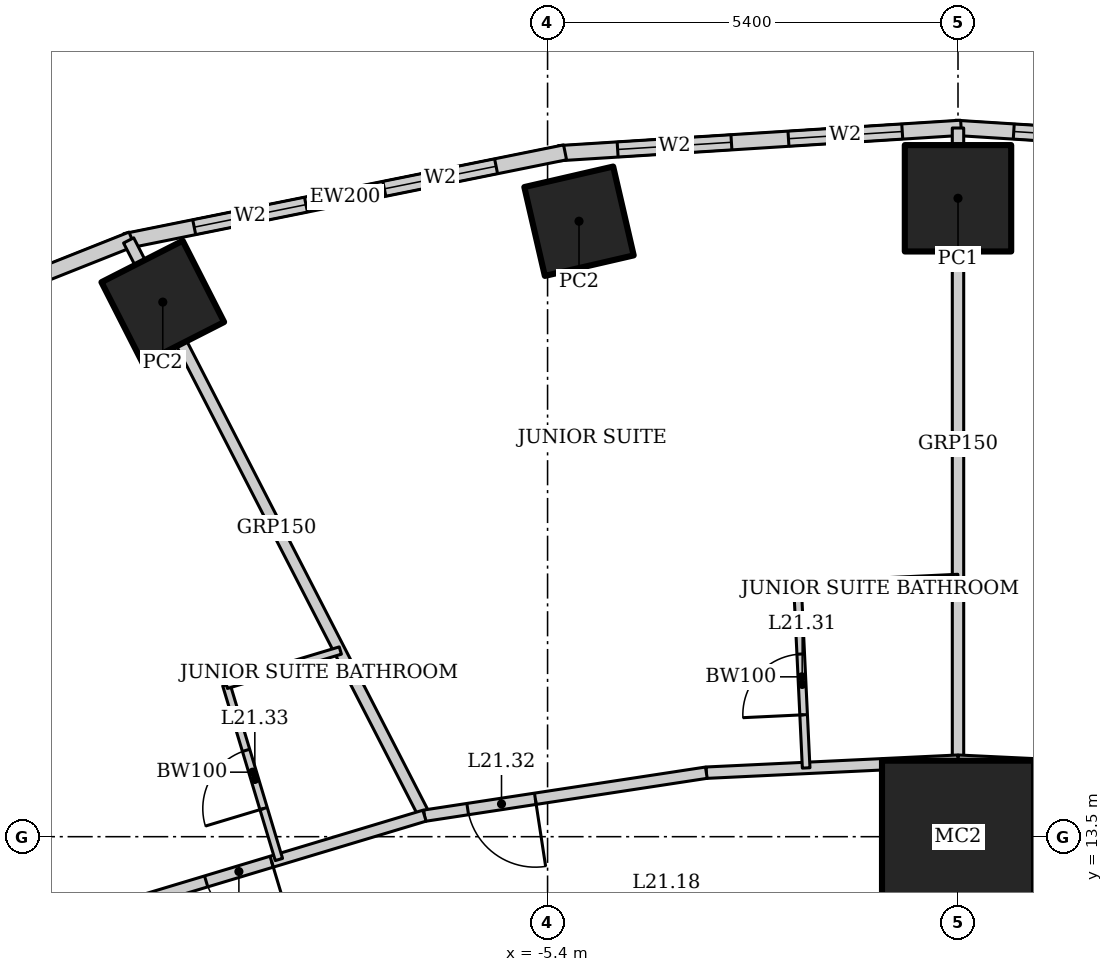
"""IFC4 building model, lengths in metres.
Left out: names, types, materials, properties, quantities, classifications, styles, units other than length and angle.
Written with IfcOpenShell. Run it as: python <this file> out.ifc"""

import sys

from ifc_helpers import new_model, si_unit, direction, frame, frame_2d, origin, origin_2d, place, context, subcontext, project, spatial, rectangle, hollow_rectangle, extrude, element, fill, save


model = new_model("IFC4")
c1 = context("Model", 3, precision=1e-05, world=origin(), true_north=direction((0.0, 1.0)))
c2 = subcontext(c1, "Body", "Model", "MODEL_VIEW")
j1 = project(units=[si_unit("LENGTHUNIT", "METRE"), si_unit("PLANEANGLEUNIT", "RADIAN")], contexts=[c1])
p1 = place(None, origin())
s1 = spatial("IfcSite", under=j1, at=p1, CompositionType="ELEMENT")
p2 = place(p1, origin())
s2 = spatial("IfcBuilding", under=s1, at=p2, CompositionType="ELEMENT")
p3 = place(p2, frame((0.0, 0.0, 91.0)))
s3 = spatial("IfcBuildingStorey", under=s2, at=p3, CompositionType="ELEMENT", Elevation=91.0)
p4 = place(p3, frame((0.0, 13.5, 0.0), z_axis=(0.0, 0.0, 1.0), x_axis=(1.0, 0.0, 0.0)))
e1 = element("IfcColumn", 1, at=p4, inside=s3, PredefinedType="COLUMN", context=c2, shape_type="SweptSolid", body=[
    extrude(hollow_rectangle(XDim=2.0, YDim=2.0, WallThickness=0.17, at=origin_2d()), origin(), (0.0, 0.0, 1.0), 3.6),
])
p5 = place(p3, frame((0.0, 21.9, 0.0), z_axis=(0.0, 0.0, 1.0), x_axis=(1.0, 0.0, 0.0)))
e2 = element("IfcColumn", 2, at=p5, inside=s3, PredefinedType="COLUMN", context=c2, shape_type="SweptSolid", body=[
    extrude(hollow_rectangle(XDim=1.4, YDim=1.4, WallThickness=0.1, at=origin_2d()), origin(), (0.0, 0.0, 1.0), 3.6),
])
for number, where, z_axis, x_axis in (
    (3, (-4.986, 21.598, 0.0), (0.0, 0.0, 1.0), (0.974, 0.225, 0.0)),
    (4, (-10.463, 20.534, 0.0), (0.0, 0.0, 1.0), (0.891, 0.454, 0.0)),
):
    element("IfcColumn", number, at=place(p3, frame(where, z_axis=z_axis, x_axis=x_axis)), inside=s3, PredefinedType="COLUMN", context=c2, shape_type="SweptSolid", body=[
        extrude(hollow_rectangle(XDim=1.2, YDim=1.2, WallThickness=0.1, at=origin_2d()), origin(), (0.0, 0.0, 1.0), 3.6),
    ])
p6 = place(p3, frame((5.253, 22.493, 0.0), z_axis=(0.0, 0.0, 1.0), x_axis=(-0.998018582375, 0.062919863585, 0.0)))
e5 = element("IfcWall", 5, at=p6, inside=s3, PredefinedType="SOLIDWALL", context=c2, shape_type="SweptSolid", body=[
    extrude(rectangle(XDim=5.304, YDim=0.2, at=frame_2d((2.652, 0.0))), origin(), (0.0, 0.0, 1.0), 3.45),
])
p7 = place(p6, frame((0.776, 0.0, 0.5)))
e6 = element("IfcOpeningElement", 6, at=p7, cuts=e5, PredefinedType="OPENING", context=c2, shape_type="SweptSolid", body=[
    extrude(rectangle(XDim=1.5, YDim=2.2, at=frame_2d((0.75, 1.1))), frame((0.0, 0.11, 0.0), z_axis=(0.0, -1.0, 0.0), x_axis=(1.0, 0.0, 0.0)), (0.0, 0.0, 1.0), 0.22),
])
p8 = place(p6, frame((3.028, 0.0, 0.5)))
e7 = element("IfcOpeningElement", 7, at=p8, cuts=e5, PredefinedType="OPENING", context=c2, shape_type="SweptSolid", body=[
    extrude(rectangle(XDim=1.5, YDim=2.2, at=frame_2d((0.75, 1.1))), frame((0.0, 0.11, 0.0), z_axis=(0.0, -1.0, 0.0), x_axis=(1.0, 0.0, 0.0)), (0.0, 0.0, 1.0), 0.22),
])
p9 = place(p3, frame((0.041, 22.827, 0.0), z_axis=(0.0, 0.0, 1.0), x_axis=(-0.998018582375, -0.062919863585, 0.0)))
e8 = element("IfcWall", 8, at=p9, inside=s3, PredefinedType="SOLIDWALL", context=c2, shape_type="SweptSolid", body=[
    extrude(rectangle(XDim=5.304, YDim=0.2, at=frame_2d((2.652, 0.0))), origin(), (0.0, 0.0, 1.0), 3.45),
])
p10 = place(p9, frame((0.776, 0.0, 0.5)))
e9 = element("IfcOpeningElement", 9, at=p10, cuts=e8, PredefinedType="OPENING", context=c2, shape_type="SweptSolid", body=[
    extrude(rectangle(XDim=1.5, YDim=2.2, at=frame_2d((0.75, 1.1))), frame((0.0, 0.11, 0.0), z_axis=(0.0, -1.0, 0.0), x_axis=(1.0, 0.0, 0.0)), (0.0, 0.0, 1.0), 0.22),
])
p11 = place(p9, frame((3.028, 0.0, 0.5)))
e10 = element("IfcOpeningElement", 10, at=p11, cuts=e8, PredefinedType="OPENING", context=c2, shape_type="SweptSolid", body=[
    extrude(rectangle(XDim=1.5, YDim=2.2, at=frame_2d((0.75, 1.1))), frame((0.0, 0.11, 0.0), z_axis=(0.0, -1.0, 0.0), x_axis=(1.0, 0.0, 0.0)), (0.0, 0.0, 1.0), 0.22),
])
p12 = place(p3, frame((-5.17, 22.504, 0.0), z_axis=(0.0, 0.0, 1.0), x_axis=(-0.980251657452, -0.197754110105, 0.0)))
e11 = element("IfcWall", 11, at=p12, inside=s3, PredefinedType="SOLIDWALL", context=c2, shape_type="SweptSolid", body=[
    extrude(rectangle(XDim=5.904, YDim=0.2, at=frame_2d((2.952, 0.0))), origin(), (0.0, 0.0, 1.0), 3.45),
])
p13 = place(p12, frame((0.926, 0.0, 0.5)))
e12 = element("IfcOpeningElement", 12, at=p13, cuts=e11, PredefinedType="OPENING", context=c2, shape_type="SweptSolid", body=[
    extrude(rectangle(XDim=1.5, YDim=2.2, at=frame_2d((0.75, 1.1))), frame((0.0, 0.11, 0.0), z_axis=(0.0, -1.0, 0.0), x_axis=(1.0, 0.0, 0.0)), (0.0, 0.0, 1.0), 0.22),
])
p14 = place(p12, frame((3.478, 0.0, 0.5)))
e13 = element("IfcOpeningElement", 13, at=p14, cuts=e11, PredefinedType="OPENING", context=c2, shape_type="SweptSolid", body=[
    extrude(rectangle(XDim=1.5, YDim=2.2, at=frame_2d((0.75, 1.1))), frame((0.0, 0.11, 0.0), z_axis=(0.0, -1.0, 0.0), x_axis=(1.0, 0.0, 0.0)), (0.0, 0.0, 1.0), 0.22),
])
p15 = place(p3, frame((-10.869, 21.363, 0.0), z_axis=(0.0, 0.0, 1.0), x_axis=(-0.929358351251, -0.369178892895, 0.0)))
e14 = element("IfcWall", 14, at=p15, inside=s3, PredefinedType="SOLIDWALL", context=c2, shape_type="SweptSolid", body=[
    extrude(rectangle(XDim=7.692, YDim=0.2, at=frame_2d((3.846, 0.0))), origin(), (0.0, 0.0, 1.0), 3.45),
])
p16 = place(p15, frame((1.373, 0.0, 0.5)))
e15 = element("IfcOpeningElement", 15, at=p16, cuts=e14, PredefinedType="OPENING", context=c2, shape_type="SweptSolid", body=[
    extrude(rectangle(XDim=1.5, YDim=2.2, at=frame_2d((0.75, 1.1))), frame((0.0, 0.11, 0.0), z_axis=(0.0, -1.0, 0.0), x_axis=(1.0, 0.0, 0.0)), (0.0, 0.0, 1.0), 0.22),
])
p17 = place(p15, frame((4.819, 0.0, 0.5)))
e16 = element("IfcOpeningElement", 16, at=p17, cuts=e14, PredefinedType="OPENING", context=c2, shape_type="SweptSolid", body=[
    extrude(rectangle(XDim=1.5, YDim=2.2, at=frame_2d((0.75, 1.1))), frame((0.0, 0.11, 0.0), z_axis=(0.0, -1.0, 0.0), x_axis=(1.0, 0.0, 0.0)), (0.0, 0.0, 1.0), 0.22),
])
p18 = place(p3, frame((0.0, 22.825, 0.0), z_axis=(0.0, 0.0, 1.0), x_axis=(0.0, -1.0, 0.0)))
e17 = element("IfcWall", 17, at=p18, inside=s3, PredefinedType="PARTITIONING", context=c2, shape_type="SweptSolid", body=[
    extrude(rectangle(XDim=8.325, YDim=0.15, at=frame_2d((4.162, 0.0))), origin(), (0.0, 0.0, 1.0), 2.924),
])
p19 = place(p3, frame((-10.912, 21.346, 0.0), z_axis=(0.0, 0.0, 1.0), x_axis=(0.457327273085, -0.889298468059, 0.0)))
e18 = element("IfcWall", 18, at=p19, inside=s3, PredefinedType="PARTITIONING", context=c2, shape_type="SweptSolid", body=[
    extrude(rectangle(XDim=8.511, YDim=0.15, at=frame_2d((4.256, 0.0))), origin(), (0.0, 0.0, 1.0), 2.528),
])
p20 = place(p3, frame((3.311, 14.342, 0.0), z_axis=(0.0, 0.0, 1.0), x_axis=(-0.998863968075, 0.047652631422, 0.0)))
e19 = element("IfcWall", 19, at=p20, inside=s3, PredefinedType="PARTITIONING", context=c2, shape_type="SweptSolid", body=[
    extrude(rectangle(XDim=3.315, YDim=0.15, at=frame_2d((1.657, 0.0))), origin(), (0.0, 0.0, 1.0), 3.45),
])
p21 = place(p20, frame((0.15, 0.0, 0.0)))
e20 = element("IfcOpeningElement", 20, at=p21, cuts=e19, PredefinedType="OPENING", context=c2, shape_type="SweptSolid", body=[
    extrude(rectangle(XDim=0.9, YDim=2.1, at=frame_2d((0.45, 1.05))), frame((0.0, 0.085, 0.0), z_axis=(0.0, -1.0, 0.0), x_axis=(1.0, 0.0, 0.0)), (0.0, 0.0, 1.0), 0.17),
])
p22 = place(p3, frame((0.0, 14.5, 0.0), z_axis=(0.0, 0.0, 1.0), x_axis=(-0.998863968075, -0.047652631422, 0.0)))
e21 = element("IfcWall", 21, at=p22, inside=s3, PredefinedType="PARTITIONING", context=c2, shape_type="SweptSolid", body=[
    extrude(rectangle(XDim=3.315, YDim=0.15, at=frame_2d((1.657, 0.0))), origin(), (0.0, 0.0, 1.0), 3.45),
])
p23 = place(p3, frame((-3.311, 14.342, 0.0), z_axis=(0.0, 0.0, 1.0), x_axis=(-0.988564270062, -0.150800145746, 0.0)))
e22 = element("IfcWall", 22, at=p23, inside=s3, PredefinedType="PARTITIONING", context=c2, shape_type="SweptSolid", body=[
    extrude(rectangle(XDim=3.751, YDim=0.15, at=frame_2d((1.875, 0.0))), origin(), (0.0, 0.0, 1.0), 3.45),
])
p24 = place(p23, frame((2.276, 0.0, 0.0)))
e23 = element("IfcOpeningElement", 23, at=p24, cuts=e22, PredefinedType="OPENING", context=c2, shape_type="SweptSolid", body=[
    extrude(rectangle(XDim=0.9, YDim=2.1, at=frame_2d((0.45, 1.05))), frame((0.0, 0.085, 0.0), z_axis=(0.0, -1.0, 0.0), x_axis=(1.0, 0.0, 0.0)), (0.0, 0.0, 1.0), 0.17),
])
p25 = place(p3, frame((-7.019, 13.776, 0.0), z_axis=(0.0, 0.0, 1.0), x_axis=(-0.957564241242, -0.288219922793, 0.0)))
e24 = element("IfcWall", 24, at=p25, inside=s3, PredefinedType="PARTITIONING", context=c2, shape_type="SweptSolid", body=[
    extrude(rectangle(XDim=5.085, YDim=0.15, at=frame_2d((2.542, 0.0))), origin(), (0.0, 0.0, 1.0), 3.45),
])
p26 = place(p25, frame((2.1, 0.0, 0.0)))
e25 = element("IfcOpeningElement", 25, at=p26, cuts=e24, PredefinedType="OPENING", context=c2, shape_type="SweptSolid", body=[
    extrude(rectangle(XDim=0.9, YDim=2.1, at=frame_2d((0.45, 1.05))), frame((0.0, 0.085, 0.0), z_axis=(0.0, -1.0, 0.0), x_axis=(1.0, 0.0, 0.0)), (0.0, 0.0, 1.0), 0.17),
])
p27 = place(p3, frame((-1.998, 14.405, 0.0), z_axis=(0.0, 0.0, 1.0), x_axis=(-0.047608648396, 0.998866065395, 0.0)))
e26 = element("IfcWall", 26, at=p27, inside=s3, PredefinedType="PARTITIONING", context=c2, shape_type="SweptSolid", body=[
    extrude(rectangle(XDim=2.4, YDim=0.1, at=frame_2d((1.2, 0.0))), origin(), (0.0, 0.0, 1.0), 2.749),
])
p28 = place(p27, frame((0.7, 0.0, 0.0)))
e27 = element("IfcOpeningElement", 27, at=p28, cuts=e26, PredefinedType="OPENING", context=c2, shape_type="SweptSolid", body=[
    extrude(rectangle(XDim=0.8, YDim=2.1, at=frame_2d((0.4, 1.05))), frame((0.0, 0.06, 0.0), z_axis=(0.0, -1.0, 0.0), x_axis=(1.0, 0.0, 0.0)), (0.0, 0.0, 1.0), 0.12),
])
p29 = place(p3, frame((-2.112, 16.802, 0.0), z_axis=(0.0, 0.0, 1.0), x_axis=(0.998862383453, 0.047685835668, 0.0)))
e28 = element("IfcWall", 28, at=p29, inside=s3, PredefinedType="PARTITIONING", context=c2, shape_type="SweptSolid", body=[
    extrude(rectangle(XDim=2.115, YDim=0.1, at=frame_2d((1.057, 0.0))), origin(), (0.0, 0.0, 1.0), 3.45),
])
p30 = place(p3, frame((-8.935, 13.2, 0.0), z_axis=(0.0, 0.0, 1.0), x_axis=(-0.288197066254, 0.957571120598, 0.0)))
e29 = element("IfcWall", 29, at=p30, inside=s3, PredefinedType="PARTITIONING", context=c2, shape_type="SweptSolid", body=[
    extrude(rectangle(XDim=2.4, YDim=0.1, at=frame_2d((1.2, 0.0))), origin(), (0.0, 0.0, 1.0), 3.45),
])
p31 = place(p30, frame((0.7, 0.0, 0.0)))
e30 = element("IfcOpeningElement", 30, at=p31, cuts=e29, PredefinedType="OPENING", context=c2, shape_type="SweptSolid", body=[
    extrude(rectangle(XDim=0.8, YDim=2.1, at=frame_2d((0.4, 1.05))), frame((0.0, 0.06, 0.0), z_axis=(0.0, -1.0, 0.0), x_axis=(1.0, 0.0, 0.0)), (0.0, 0.0, 1.0), 0.12),
])
p32 = place(p3, frame((-9.626, 15.498, 0.0), z_axis=(0.0, 0.0, 1.0), x_axis=(0.957551231109, 0.288263143328, 0.0)))
e31 = element("IfcWall", 31, at=p32, inside=s3, PredefinedType="PARTITIONING", context=c2, shape_type="SweptSolid", body=[
    extrude(rectangle(XDim=1.566, YDim=0.1, at=frame_2d((0.783, 0.0))), origin(), (0.0, 0.0, 1.0), 3.45),
])
p33 = place(p8, origin())
e32 = element("IfcWindow", 32, at=p33, inside=s3, PartitioningType="SINGLE_PANEL", PredefinedType="WINDOW", context=c2, shape_type="SweptSolid", body=[
    extrude(rectangle(XDim=1.5, YDim=2.2, at=frame_2d((0.75, 1.1))), frame((0.0, 0.03, 0.0), z_axis=(0.0, -1.0, 0.0), x_axis=(1.0, 0.0, 0.0)), (0.0, 0.0, 1.0), 0.06),
])
fill(e7, e32)
p34 = place(p10, origin())
e33 = element("IfcWindow", 33, at=p34, inside=s3, PartitioningType="SINGLE_PANEL", PredefinedType="WINDOW", context=c2, shape_type="SweptSolid", body=[
    extrude(rectangle(XDim=1.5, YDim=2.2, at=frame_2d((0.75, 1.1))), frame((0.0, 0.03, 0.0), z_axis=(0.0, -1.0, 0.0), x_axis=(1.0, 0.0, 0.0)), (0.0, 0.0, 1.0), 0.06),
])
fill(e9, e33)
p35 = place(p11, origin())
e34 = element("IfcWindow", 34, at=p35, inside=s3, PartitioningType="SINGLE_PANEL", PredefinedType="WINDOW", context=c2, shape_type="SweptSolid", body=[
    extrude(rectangle(XDim=1.5, YDim=2.2, at=frame_2d((0.75, 1.1))), frame((0.0, 0.03, 0.0), z_axis=(0.0, -1.0, 0.0), x_axis=(1.0, 0.0, 0.0)), (0.0, 0.0, 1.0), 0.06),
])
fill(e10, e34)
p36 = place(p13, origin())
e35 = element("IfcWindow", 35, at=p36, inside=s3, PartitioningType="SINGLE_PANEL", PredefinedType="WINDOW", context=c2, shape_type="SweptSolid", body=[
    extrude(rectangle(XDim=1.5, YDim=2.2, at=frame_2d((0.75, 1.1))), frame((0.0, 0.03, 0.0), z_axis=(0.0, -1.0, 0.0), x_axis=(1.0, 0.0, 0.0)), (0.0, 0.0, 1.0), 0.06),
])
fill(e12, e35)
p37 = place(p14, origin())
e36 = element("IfcWindow", 36, at=p37, inside=s3, PartitioningType="SINGLE_PANEL", PredefinedType="WINDOW", context=c2, shape_type="SweptSolid", body=[
    extrude(rectangle(XDim=1.5, YDim=2.2, at=frame_2d((0.75, 1.1))), frame((0.0, 0.03, 0.0), z_axis=(0.0, -1.0, 0.0), x_axis=(1.0, 0.0, 0.0)), (0.0, 0.0, 1.0), 0.06),
])
fill(e13, e36)
p38 = place(p28, origin())
e37 = element("IfcDoor", 37, at=p38, inside=s3, OperationType="SINGLE_SWING_LEFT", PredefinedType="DOOR", context=c2, shape_type="SweptSolid", body=[
    extrude(rectangle(XDim=0.8, YDim=2.1, at=frame_2d((0.4, 1.05))), frame((0.0, 0.025, 0.0), z_axis=(0.0, -1.0, 0.0), x_axis=(1.0, 0.0, 0.0)), (0.0, 0.0, 1.0), 0.05),
])
fill(e27, e37)
p39 = place(p24, origin())
e38 = element("IfcDoor", 38, at=p39, inside=s3, OperationType="SINGLE_SWING_LEFT", PredefinedType="DOOR", context=c2, shape_type="SweptSolid", body=[
    extrude(rectangle(XDim=0.9, YDim=2.1, at=frame_2d((0.45, 1.05))), frame((0.0, 0.025, 0.0), z_axis=(0.0, -1.0, 0.0), x_axis=(1.0, 0.0, 0.0)), (0.0, 0.0, 1.0), 0.05),
])
fill(e23, e38)
p40 = place(p31, origin())
e39 = element("IfcDoor", 39, at=p40, inside=s3, OperationType="SINGLE_SWING_LEFT", PredefinedType="DOOR", context=c2, shape_type="SweptSolid", body=[
    extrude(rectangle(XDim=0.8, YDim=2.1, at=frame_2d((0.4, 1.05))), frame((0.0, 0.025, 0.0), z_axis=(0.0, -1.0, 0.0), x_axis=(1.0, 0.0, 0.0)), (0.0, 0.0, 1.0), 0.05),
])
fill(e30, e39)
p41 = place(p26, origin())
e40 = element("IfcDoor", 40, at=p41, inside=s3, OperationType="SINGLE_SWING_LEFT", PredefinedType="DOOR", context=c2, shape_type="SweptSolid", body=[
    extrude(rectangle(XDim=0.9, YDim=2.1, at=frame_2d((0.45, 1.05))), frame((0.0, 0.025, 0.0), z_axis=(0.0, -1.0, 0.0), x_axis=(1.0, 0.0, 0.0)), (0.0, 0.0, 1.0), 0.05),
])
fill(e25, e40)
save(model, sys.argv[1])
